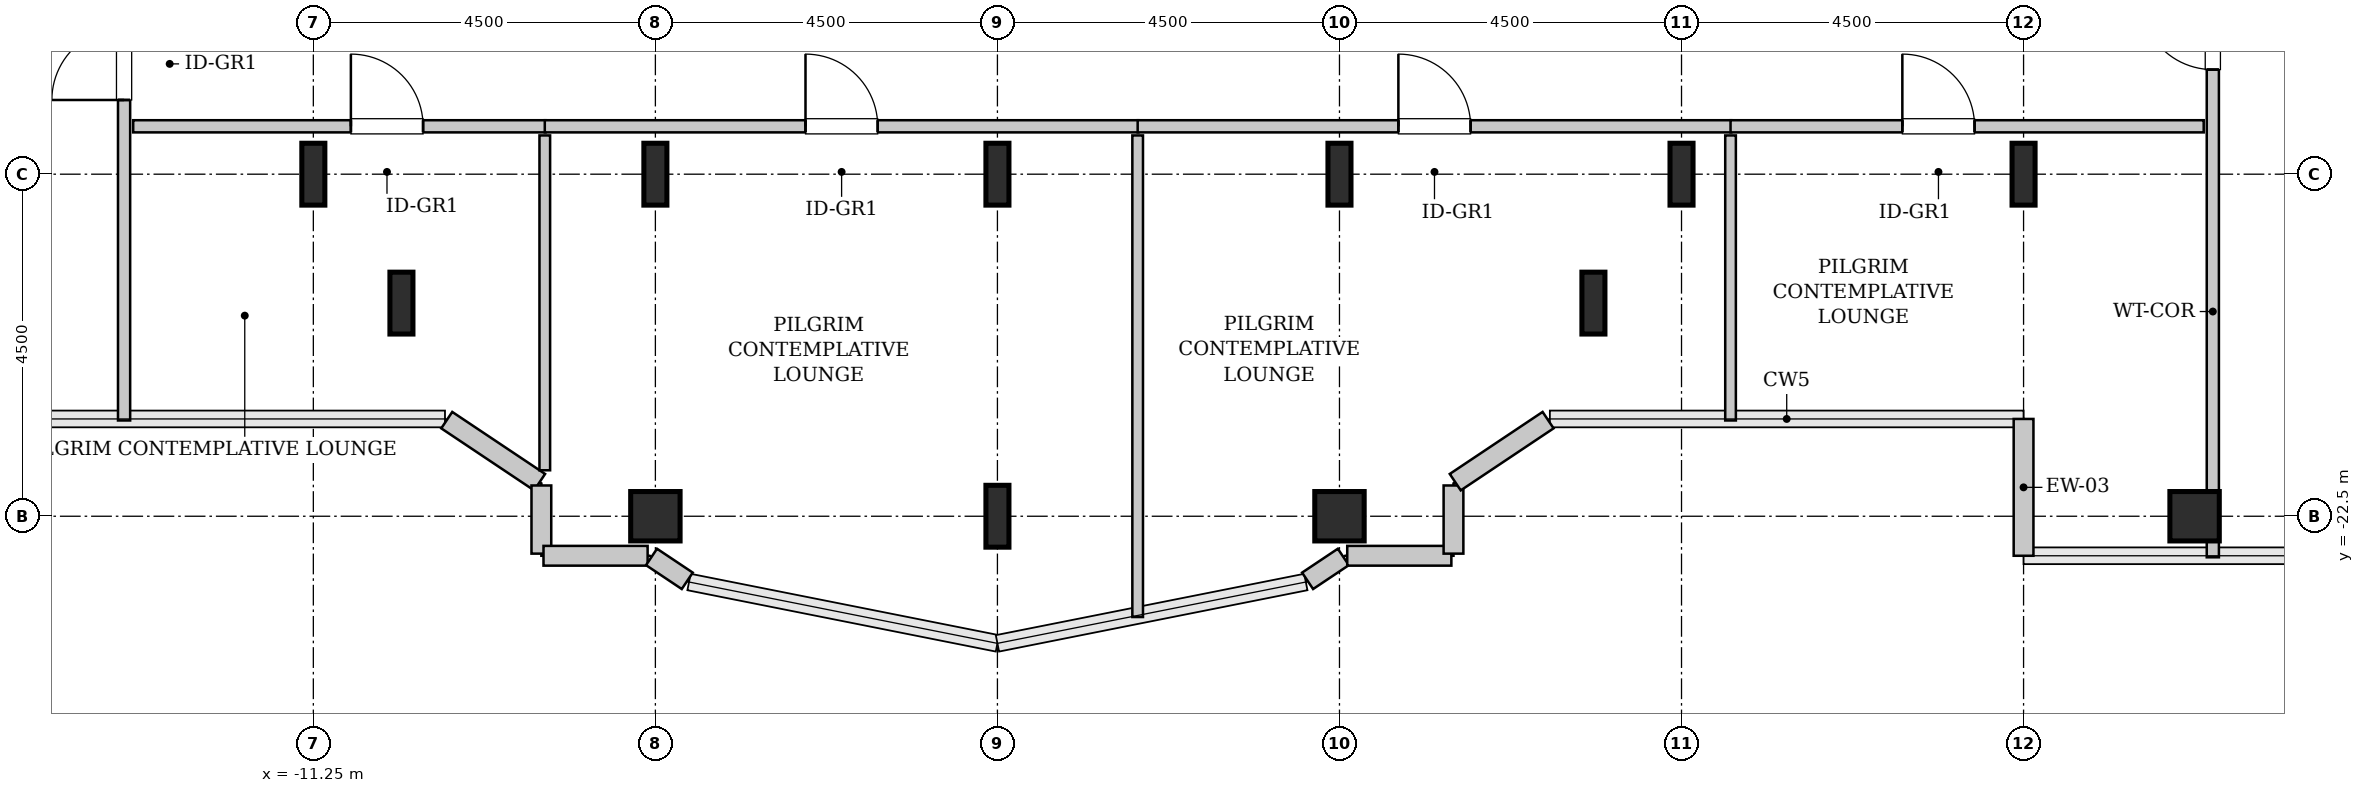
"""IFC4 building model, lengths in metres.
Left out: names, types, materials, properties, quantities, classifications, styles, units other than length and angle.
Written with IfcOpenShell. Run it as: python <this file> out.ifc"""

import sys

from ifc_helpers import new_model, si_unit, direction, frame, frame_2d, origin, origin_2d, place, context, subcontext, project, spatial, rectangle, hollow_rectangle, i_section, extrude, source, transform, mapped, element, fill, save


model = new_model("IFC4")
c1 = context("Model", 3, precision=1e-05, world=origin(), true_north=direction((0.0, 1.0)))
c2 = subcontext(c1, "Body", "Model", "MODEL_VIEW")
j1 = project(units=[si_unit("LENGTHUNIT", "METRE"), si_unit("PLANEANGLEUNIT", "RADIAN")], contexts=[c1])
p1 = place(None, origin())
s1 = spatial("IfcSite", under=j1, at=p1, CompositionType="ELEMENT")
p2 = place(p1, origin())
s2 = spatial("IfcBuilding", under=s1, at=p2, CompositionType="ELEMENT")
p3 = place(p2, frame((0.0, 0.0, 206.6)))
s3 = spatial("IfcBuildingStorey", under=s2, at=p3, CompositionType="ELEMENT", Elevation=206.6)
m1 = source(origin(), c2, "Body", "SweptSolid", [
    extrude(i_section(OverallWidth=0.303, OverallDepth=0.814, WebThickness=0.021, FlangeThickness=0.04, FilletRadius=0.03, at=origin_2d()), origin(), (0.0, 0.0, 1.0), 3.8),
])
for number, where, z_axis, x_axis in (
    (1, (-11.25, -18.0, 0.0), (0.0, 0.0, 1.0), (1.0, 0.0, 0.0)),
    (2, (-10.091, -19.696, 0.0), (0.0, 0.0, 1.0), (1.0, 0.0, 0.0)),
):
    element("IfcColumn", number, at=place(p3, frame(where, z_axis=z_axis, x_axis=x_axis)), inside=s3, PredefinedType="COLUMN", context=c2, shape_type="MappedRepresentation", body=[
        mapped(m1, transform((0.0, 0.0, 0.0), x_axis=(1.0, 0.0, 0.0), y_axis=(0.0, 1.0, 0.0), z_axis=(0.0, 0.0, 1.0), scale=1.0)),
    ])
m2 = source(origin(), c2, "Body", "SweptSolid", [
    extrude(hollow_rectangle(XDim=0.65, YDim=0.65, WallThickness=0.032, InnerFilletRadius=0.032, OuterFilletRadius=0.064, at=origin_2d()), origin(), (0.0, 0.0, 1.0), 3.8),
])
p4 = place(p3, frame((-6.75, -22.5, 0.0), z_axis=(0.0, 0.0, 1.0), x_axis=(1.0, 0.0, 0.0)))
e3 = element("IfcColumn", 3, at=p4, inside=s3, PredefinedType="COLUMN", context=c2, shape_type="MappedRepresentation", body=[
    mapped(m2, transform((0.0, 0.0, 0.0), x_axis=(1.0, 0.0, 0.0), y_axis=(0.0, 1.0, 0.0), z_axis=(0.0, 0.0, 1.0), scale=1.0)),
])
for number, where, z_axis, x_axis in (
    (4, (-6.75, -18.0, 0.0), (0.0, 0.0, 1.0), (1.0, 0.0, 0.0)),
    (5, (-2.25, -22.5, 0.0), (0.0, 0.0, 1.0), (1.0, 0.0, 0.0)),
    (6, (-2.25, -18.0, 0.0), (0.0, 0.0, 1.0), (1.0, 0.0, 0.0)),
):
    element("IfcColumn", number, at=place(p3, frame(where, z_axis=z_axis, x_axis=x_axis)), inside=s3, PredefinedType="COLUMN", context=c2, shape_type="MappedRepresentation", body=[
        mapped(m1, transform((0.0, 0.0, 0.0), x_axis=(1.0, 0.0, 0.0), y_axis=(0.0, 1.0, 0.0), z_axis=(0.0, 0.0, 1.0), scale=1.0)),
    ])
p5 = place(p3, frame((2.25, -22.5, 0.0), z_axis=(0.0, 0.0, 1.0), x_axis=(1.0, 0.0, 0.0)))
e7 = element("IfcColumn", 7, at=p5, inside=s3, PredefinedType="COLUMN", context=c2, shape_type="MappedRepresentation", body=[
    mapped(m2, transform((0.0, 0.0, 0.0), x_axis=(1.0, 0.0, 0.0), y_axis=(0.0, 1.0, 0.0), z_axis=(0.0, 0.0, 1.0), scale=1.0)),
])
for number, where, z_axis, x_axis in (
    (8, (2.25, -18.0, 0.0), (0.0, 0.0, 1.0), (1.0, 0.0, 0.0)),
    (9, (5.591, -19.696, 0.0), (0.0, 0.0, 1.0), (1.0, 0.0, 0.0)),
    (10, (6.75, -18.0, 0.0), (0.0, 0.0, 1.0), (1.0, 0.0, 0.0)),
    (11, (11.25, -18.0, 0.0), (0.0, 0.0, 1.0), (1.0, 0.0, 0.0)),
):
    element("IfcColumn", number, at=place(p3, frame(where, z_axis=z_axis, x_axis=x_axis)), inside=s3, PredefinedType="COLUMN", context=c2, shape_type="MappedRepresentation", body=[
        mapped(m1, transform((0.0, 0.0, 0.0), x_axis=(1.0, 0.0, 0.0), y_axis=(0.0, 1.0, 0.0), z_axis=(0.0, 0.0, 1.0), scale=1.0)),
    ])
p6 = place(p3, frame((13.5, -22.5, 0.0), z_axis=(0.0, 0.0, 1.0), x_axis=(1.0, 0.0, 0.0)))
e12 = element("IfcColumn", 12, at=p6, inside=s3, PredefinedType="COLUMN", context=c2, shape_type="MappedRepresentation", body=[
    mapped(m2, transform((0.0, 0.0, 0.0), x_axis=(1.0, 0.0, 0.0), y_axis=(0.0, 1.0, 0.0), z_axis=(0.0, 0.0, 1.0), scale=1.0)),
])
m3 = source(origin(), c2, "Body", "SweptSolid", [
    extrude(rectangle(XDim=1.8, YDim=0.26, at=frame_2d((0.9, 0.0))), origin(), (0.0, 0.0, 1.0), 3.55),
])
p7 = place(p3, frame((11.25, -21.22, 0.0), z_axis=(0.0, 0.0, 1.0), x_axis=(0.0, -1.0, 0.0)))
e13 = element("IfcWall", 13, at=p7, inside=s3, PredefinedType="SOLIDWALL", context=c2, shape_type="MappedRepresentation", body=[
    mapped(m3, transform((0.0, 0.0, 0.0), x_axis=(1.0, 0.0, 0.0), y_axis=(0.0, 1.0, 0.0), z_axis=(0.0, 0.0, 1.0), scale=1.0)),
])
m4 = source(origin(), c2, "Body", "SweptSolid", [
    extrude(rectangle(XDim=1.469, YDim=0.26, at=frame_2d((0.734, 0.0))), origin(), (0.0, 0.0, 1.0), 3.55),
])
p8 = place(p3, frame((-9.495, -21.236, 0.0), z_axis=(0.0, 0.0, 1.0), x_axis=(0.831461760506, -0.555581983884, 0.0)))
e14 = element("IfcWall", 14, at=p8, inside=s3, PredefinedType="SOLIDWALL", context=c2, shape_type="MappedRepresentation", body=[
    mapped(m4, transform((0.0, 0.0, 0.0), x_axis=(1.0, 0.0, 0.0), y_axis=(0.0, 1.0, 0.0), z_axis=(0.0, 0.0, 1.0), scale=1.0)),
])
m5 = source(origin(), c2, "Body", "SweptSolid", [
    extrude(rectangle(XDim=0.897, YDim=0.26, at=frame_2d((0.448, 0.0))), origin(), (0.0, 0.0, 1.0), 3.55),
])
p9 = place(p3, frame((-8.25, -22.095, 0.0), z_axis=(0.0, 0.0, 1.0), x_axis=(0.0, -1.0, 0.0)))
e15 = element("IfcWall", 15, at=p9, inside=s3, PredefinedType="SOLIDWALL", context=c2, shape_type="MappedRepresentation", body=[
    mapped(m5, transform((0.0, 0.0, 0.0), x_axis=(1.0, 0.0, 0.0), y_axis=(0.0, 1.0, 0.0), z_axis=(0.0, 0.0, 1.0), scale=1.0)),
])
m6 = source(origin(), c2, "Body", "SweptSolid", [
    extrude(rectangle(XDim=1.37, YDim=0.26, at=frame_2d((0.685, 0.0))), origin(), (0.0, 0.0, 1.0), 3.55),
])
p10 = place(p3, frame((-8.222, -23.02, 0.0), z_axis=(0.0, 0.0, 1.0), x_axis=(1.0, 0.0, 0.0)))
e16 = element("IfcWall", 16, at=p10, inside=s3, PredefinedType="SOLIDWALL", context=c2, shape_type="MappedRepresentation", body=[
    mapped(m6, transform((0.0, 0.0, 0.0), x_axis=(1.0, 0.0, 0.0), y_axis=(0.0, 1.0, 0.0), z_axis=(0.0, 0.0, 1.0), scale=1.0)),
])
m7 = source(origin(), c2, "Body", "SweptSolid", [
    extrude(rectangle(XDim=0.565, YDim=0.26, at=frame_2d((0.283, 0.0))), origin(), (0.0, 0.0, 1.0), 3.55),
])
for number, where, z_axis, x_axis in (
    (17, (-6.801, -23.036, 0.0), (0.0, 0.0, 1.0), (0.832, -0.555, 0.0)),
    (18, (1.831, -23.35, 0.0), (0.0, 0.0, 1.0), (0.832, 0.555, 0.0)),
):
    element("IfcWall", number, at=place(p3, frame(where, z_axis=z_axis, x_axis=x_axis)), inside=s3, PredefinedType="SOLIDWALL", context=c2, shape_type="MappedRepresentation", body=[
        mapped(m7, transform((0.0, 0.0, 0.0), x_axis=(1.0, 0.0, 0.0), y_axis=(0.0, 1.0, 0.0), z_axis=(0.0, 0.0, 1.0), scale=1.0)),
    ])
p11 = place(p3, frame((2.352, -23.02, 0.0), z_axis=(0.0, 0.0, 1.0), x_axis=(1.0, 0.0, 0.0)))
e19 = element("IfcWall", 19, at=p11, inside=s3, PredefinedType="SOLIDWALL", context=c2, shape_type="MappedRepresentation", body=[
    mapped(m6, transform((0.0, 0.0, 0.0), x_axis=(1.0, 0.0, 0.0), y_axis=(0.0, 1.0, 0.0), z_axis=(0.0, 0.0, 1.0), scale=1.0)),
])
p12 = place(p3, frame((3.75, -22.992, 0.0), z_axis=(0.0, 0.0, 1.0), x_axis=(0.0, 1.0, 0.0)))
e20 = element("IfcWall", 20, at=p12, inside=s3, PredefinedType="SOLIDWALL", context=c2, shape_type="MappedRepresentation", body=[
    mapped(m5, transform((0.0, 0.0, 0.0), x_axis=(1.0, 0.0, 0.0), y_axis=(0.0, 1.0, 0.0), z_axis=(0.0, 0.0, 1.0), scale=1.0)),
])
p13 = place(p3, frame((3.773, -22.052, 0.0), z_axis=(0.0, 0.0, 1.0), x_axis=(0.831461760506, 0.555581983884, 0.0)))
e21 = element("IfcWall", 21, at=p13, inside=s3, PredefinedType="SOLIDWALL", context=c2, shape_type="MappedRepresentation", body=[
    mapped(m4, transform((0.0, 0.0, 0.0), x_axis=(1.0, 0.0, 0.0), y_axis=(0.0, 1.0, 0.0), z_axis=(0.0, 0.0, 1.0), scale=1.0)),
])
m8 = source(origin(), c2, "Body", "SweptSolid", [
    extrude(rectangle(XDim=5.552, YDim=0.16, at=frame_2d((2.776, 0.0))), origin(), (0.0, 0.0, 1.0), 3.535),
])
p14 = place(p3, frame((-13.74, -21.24, 0.0), z_axis=(0.0, 0.0, 1.0), x_axis=(0.0, 1.0, 0.0)))
e22 = element("IfcWall", 22, at=p14, inside=s3, PredefinedType="PARTITIONING", context=c2, shape_type="MappedRepresentation", body=[
    mapped(m8, transform((0.0, 0.0, 0.0), x_axis=(1.0, 0.0, 0.0), y_axis=(0.0, 1.0, 0.0), z_axis=(0.0, 0.0, 1.0), scale=1.0)),
])
p15 = place(p14, frame((4.216, 0.0, 0.0)))
e23 = element("IfcOpeningElement", 23, at=p15, cuts=e22, PredefinedType="OPENING", context=c2, shape_type="SweptSolid", body=[
    extrude(rectangle(XDim=0.95, YDim=2.1, at=frame_2d((0.475, 1.05))), frame((0.0, 0.09, 0.0), z_axis=(0.0, -1.0, 0.0), x_axis=(1.0, 0.0, 0.0)), (0.0, 0.0, 1.0), 0.18),
])
m9 = source(origin(), c2, "Body", "SweptSolid", [
    extrude(rectangle(XDim=8.153, YDim=0.16, at=frame_2d((4.076, 0.0))), origin(), (0.0, 0.0, 1.0), 3.535),
])
p16 = place(p3, frame((13.74, -23.04, 0.0), z_axis=(0.0, 0.0, 1.0), x_axis=(0.0, 1.0, 0.0)))
e24 = element("IfcWall", 24, at=p16, inside=s3, PredefinedType="PARTITIONING", context=c2, shape_type="MappedRepresentation", body=[
    mapped(m9, transform((0.0, 0.0, 0.0), x_axis=(1.0, 0.0, 0.0), y_axis=(0.0, 1.0, 0.0), z_axis=(0.0, 0.0, 1.0), scale=1.0)),
])
p17 = place(p16, frame((6.416, 0.0, 0.0)))
e25 = element("IfcOpeningElement", 25, at=p17, cuts=e24, PredefinedType="OPENING", context=c2, shape_type="SweptSolid", body=[
    extrude(rectangle(XDim=0.95, YDim=2.1, at=frame_2d((0.475, 1.05))), frame((0.0, 0.09, 0.0), z_axis=(0.0, -1.0, 0.0), x_axis=(1.0, 0.0, 0.0)), (0.0, 0.0, 1.0), 0.18),
])
m10 = source(origin(), c2, "Body", "SweptSolid", [
    extrude(rectangle(XDim=5.425, YDim=0.16, at=frame_2d((2.712, 0.0))), origin(), (0.0, 0.0, 1.0), 3.535),
])
p18 = place(p3, frame((-13.62, -17.37, 0.0), z_axis=(0.0, 0.0, 1.0), x_axis=(1.0, 0.0, 0.0)))
e26 = element("IfcWall", 26, at=p18, inside=s3, PredefinedType="PARTITIONING", context=c2, shape_type="MappedRepresentation", body=[
    mapped(m10, transform((0.0, 0.0, 0.0), x_axis=(1.0, 0.0, 0.0), y_axis=(0.0, 1.0, 0.0), z_axis=(0.0, 0.0, 1.0), scale=1.0)),
])
p19 = place(p18, frame((2.864, 0.0, 0.0)))
e27 = element("IfcOpeningElement", 27, at=p19, cuts=e26, PredefinedType="OPENING", context=c2, shape_type="SweptSolid", body=[
    extrude(rectangle(XDim=0.95, YDim=2.1, at=frame_2d((0.475, 1.05))), frame((0.0, 0.09, 0.0), z_axis=(0.0, -1.0, 0.0), x_axis=(1.0, 0.0, 0.0)), (0.0, 0.0, 1.0), 0.18),
])
m11 = source(origin(), c2, "Body", "SweptSolid", [
    extrude(rectangle(XDim=4.405, YDim=0.14, at=frame_2d((2.203, 0.0))), origin(), (0.0, 0.0, 1.0), 3.535),
])
p20 = place(p3, frame((-8.205, -21.895, 0.0), z_axis=(0.0, 0.0, 1.0), x_axis=(0.0, 1.0, 0.0)))
e28 = element("IfcWall", 28, at=p20, inside=s3, PredefinedType="PARTITIONING", context=c2, shape_type="MappedRepresentation", body=[
    mapped(m11, transform((0.0, 0.0, 0.0), x_axis=(1.0, 0.0, 0.0), y_axis=(0.0, 1.0, 0.0), z_axis=(0.0, 0.0, 1.0), scale=1.0)),
])
m12 = source(origin(), c2, "Body", "SweptSolid", [
    extrude(rectangle(XDim=7.81, YDim=0.16, at=frame_2d((3.905, 0.0))), origin(), (0.0, 0.0, 1.0), 3.535),
])
p21 = place(p3, frame((-8.205, -17.37, 0.0), z_axis=(0.0, 0.0, 1.0), x_axis=(1.0, 0.0, 0.0)))
e29 = element("IfcWall", 29, at=p21, inside=s3, PredefinedType="PARTITIONING", context=c2, shape_type="MappedRepresentation", body=[
    mapped(m12, transform((0.0, 0.0, 0.0), x_axis=(1.0, 0.0, 0.0), y_axis=(0.0, 1.0, 0.0), z_axis=(0.0, 0.0, 1.0), scale=1.0)),
])
p22 = place(p21, frame((3.43, 0.0, 0.0)))
e30 = element("IfcOpeningElement", 30, at=p22, cuts=e29, PredefinedType="OPENING", context=c2, shape_type="SweptSolid", body=[
    extrude(rectangle(XDim=0.95, YDim=2.1, at=frame_2d((0.475, 1.05))), frame((0.0, 0.09, 0.0), z_axis=(0.0, -1.0, 0.0), x_axis=(1.0, 0.0, 0.0)), (0.0, 0.0, 1.0), 0.18),
])
m13 = source(origin(), c2, "Body", "SweptSolid", [
    extrude(rectangle(XDim=6.336, YDim=0.14, at=frame_2d((3.168, 0.0))), origin(), (0.0, 0.0, 1.0), 3.535),
])
p23 = place(p3, frame((-0.405, -23.826, 0.0), z_axis=(0.0, 0.0, 1.0), x_axis=(0.0, 1.0, 0.0)))
e31 = element("IfcWall", 31, at=p23, inside=s3, PredefinedType="PARTITIONING", context=c2, shape_type="MappedRepresentation", body=[
    mapped(m13, transform((0.0, 0.0, 0.0), x_axis=(1.0, 0.0, 0.0), y_axis=(0.0, 1.0, 0.0), z_axis=(0.0, 0.0, 1.0), scale=1.0)),
])
p24 = place(p3, frame((-0.405, -17.37, 0.0), z_axis=(0.0, 0.0, 1.0), x_axis=(1.0, 0.0, 0.0)))
e32 = element("IfcWall", 32, at=p24, inside=s3, PredefinedType="PARTITIONING", context=c2, shape_type="MappedRepresentation", body=[
    mapped(m12, transform((0.0, 0.0, 0.0), x_axis=(1.0, 0.0, 0.0), y_axis=(0.0, 1.0, 0.0), z_axis=(0.0, 0.0, 1.0), scale=1.0)),
])
p25 = place(p24, frame((3.43, 0.0, 0.0)))
e33 = element("IfcOpeningElement", 33, at=p25, cuts=e32, PredefinedType="OPENING", context=c2, shape_type="SweptSolid", body=[
    extrude(rectangle(XDim=0.95, YDim=2.1, at=frame_2d((0.475, 1.05))), frame((0.0, 0.09, 0.0), z_axis=(0.0, -1.0, 0.0), x_axis=(1.0, 0.0, 0.0)), (0.0, 0.0, 1.0), 0.18),
])
m14 = source(origin(), c2, "Body", "SweptSolid", [
    extrude(rectangle(XDim=3.75, YDim=0.14, at=frame_2d((1.875, 0.0))), origin(), (0.0, 0.0, 1.0), 3.535),
])
p26 = place(p3, frame((7.395, -21.24, 0.0), z_axis=(0.0, 0.0, 1.0), x_axis=(0.0, 1.0, 0.0)))
e34 = element("IfcWall", 34, at=p26, inside=s3, PredefinedType="PARTITIONING", context=c2, shape_type="MappedRepresentation", body=[
    mapped(m14, transform((0.0, 0.0, 0.0), x_axis=(1.0, 0.0, 0.0), y_axis=(0.0, 1.0, 0.0), z_axis=(0.0, 0.0, 1.0), scale=1.0)),
])
m15 = source(origin(), c2, "Body", "SweptSolid", [
    extrude(rectangle(XDim=6.225, YDim=0.16, at=frame_2d((3.113, 0.0))), origin(), (0.0, 0.0, 1.0), 3.535),
])
p27 = place(p3, frame((7.395, -17.37, 0.0), z_axis=(0.0, 0.0, 1.0), x_axis=(1.0, 0.0, 0.0)))
e35 = element("IfcWall", 35, at=p27, inside=s3, PredefinedType="PARTITIONING", context=c2, shape_type="MappedRepresentation", body=[
    mapped(m15, transform((0.0, 0.0, 0.0), x_axis=(1.0, 0.0, 0.0), y_axis=(0.0, 1.0, 0.0), z_axis=(0.0, 0.0, 1.0), scale=1.0)),
])
p28 = place(p27, frame((2.26, 0.0, 0.0)))
e36 = element("IfcOpeningElement", 36, at=p28, cuts=e35, PredefinedType="OPENING", context=c2, shape_type="SweptSolid", body=[
    extrude(rectangle(XDim=0.95, YDim=2.1, at=frame_2d((0.475, 1.05))), frame((0.0, 0.09, 0.0), z_axis=(0.0, -1.0, 0.0), x_axis=(1.0, 0.0, 0.0)), (0.0, 0.0, 1.0), 0.18),
])
m16 = source(origin(), c2, "Body", "SweptSolid", [
    extrude(rectangle(XDim=0.95, YDim=2.1, at=frame_2d((0.475, 1.05))), frame((0.0, 0.025, 0.0), z_axis=(0.0, -1.0, 0.0), x_axis=(1.0, 0.0, 0.0)), (0.0, 0.0, 1.0), 0.05),
])
p29 = place(p15, origin())
e37 = element("IfcDoor", 37, at=p29, inside=s3, OperationType="SINGLE_SWING_LEFT", PredefinedType="DOOR", context=c2, shape_type="MappedRepresentation", body=[
    mapped(m16, transform((0.0, 0.0, 0.0), x_axis=(1.0, 0.0, 0.0), y_axis=(0.0, 1.0, 0.0), z_axis=(0.0, 0.0, 1.0), scale=1.0)),
])
fill(e23, e37)
p30 = place(p17, origin())
e38 = element("IfcDoor", 38, at=p30, inside=s3, OperationType="SINGLE_SWING_RIGHT", PredefinedType="DOOR", context=c2, shape_type="MappedRepresentation", body=[
    mapped(m16, transform((0.0, 0.0, 0.0), x_axis=(1.0, 0.0, 0.0), y_axis=(0.0, 1.0, 0.0), z_axis=(0.0, 0.0, 1.0), scale=1.0)),
])
fill(e25, e38)
p31 = place(p19, origin())
e39 = element("IfcDoor", 39, at=p31, inside=s3, OperationType="SINGLE_SWING_LEFT", PredefinedType="DOOR", context=c2, shape_type="MappedRepresentation", body=[
    mapped(m16, transform((0.0, 0.0, 0.0), x_axis=(1.0, 0.0, 0.0), y_axis=(0.0, 1.0, 0.0), z_axis=(0.0, 0.0, 1.0), scale=1.0)),
])
fill(e27, e39)
p32 = place(p22, origin())
e40 = element("IfcDoor", 40, at=p32, inside=s3, OperationType="SINGLE_SWING_LEFT", PredefinedType="DOOR", context=c2, shape_type="MappedRepresentation", body=[
    mapped(m16, transform((0.0, 0.0, 0.0), x_axis=(1.0, 0.0, 0.0), y_axis=(0.0, 1.0, 0.0), z_axis=(0.0, 0.0, 1.0), scale=1.0)),
])
fill(e30, e40)
p33 = place(p25, origin())
e41 = element("IfcDoor", 41, at=p33, inside=s3, OperationType="SINGLE_SWING_LEFT", PredefinedType="DOOR", context=c2, shape_type="MappedRepresentation", body=[
    mapped(m16, transform((0.0, 0.0, 0.0), x_axis=(1.0, 0.0, 0.0), y_axis=(0.0, 1.0, 0.0), z_axis=(0.0, 0.0, 1.0), scale=1.0)),
])
fill(e33, e41)
p34 = place(p28, origin())
e42 = element("IfcDoor", 42, at=p34, inside=s3, OperationType="SINGLE_SWING_LEFT", PredefinedType="DOOR", context=c2, shape_type="MappedRepresentation", body=[
    mapped(m16, transform((0.0, 0.0, 0.0), x_axis=(1.0, 0.0, 0.0), y_axis=(0.0, 1.0, 0.0), z_axis=(0.0, 0.0, 1.0), scale=1.0)),
])
fill(e36, e42)
save(model, sys.argv[1])
